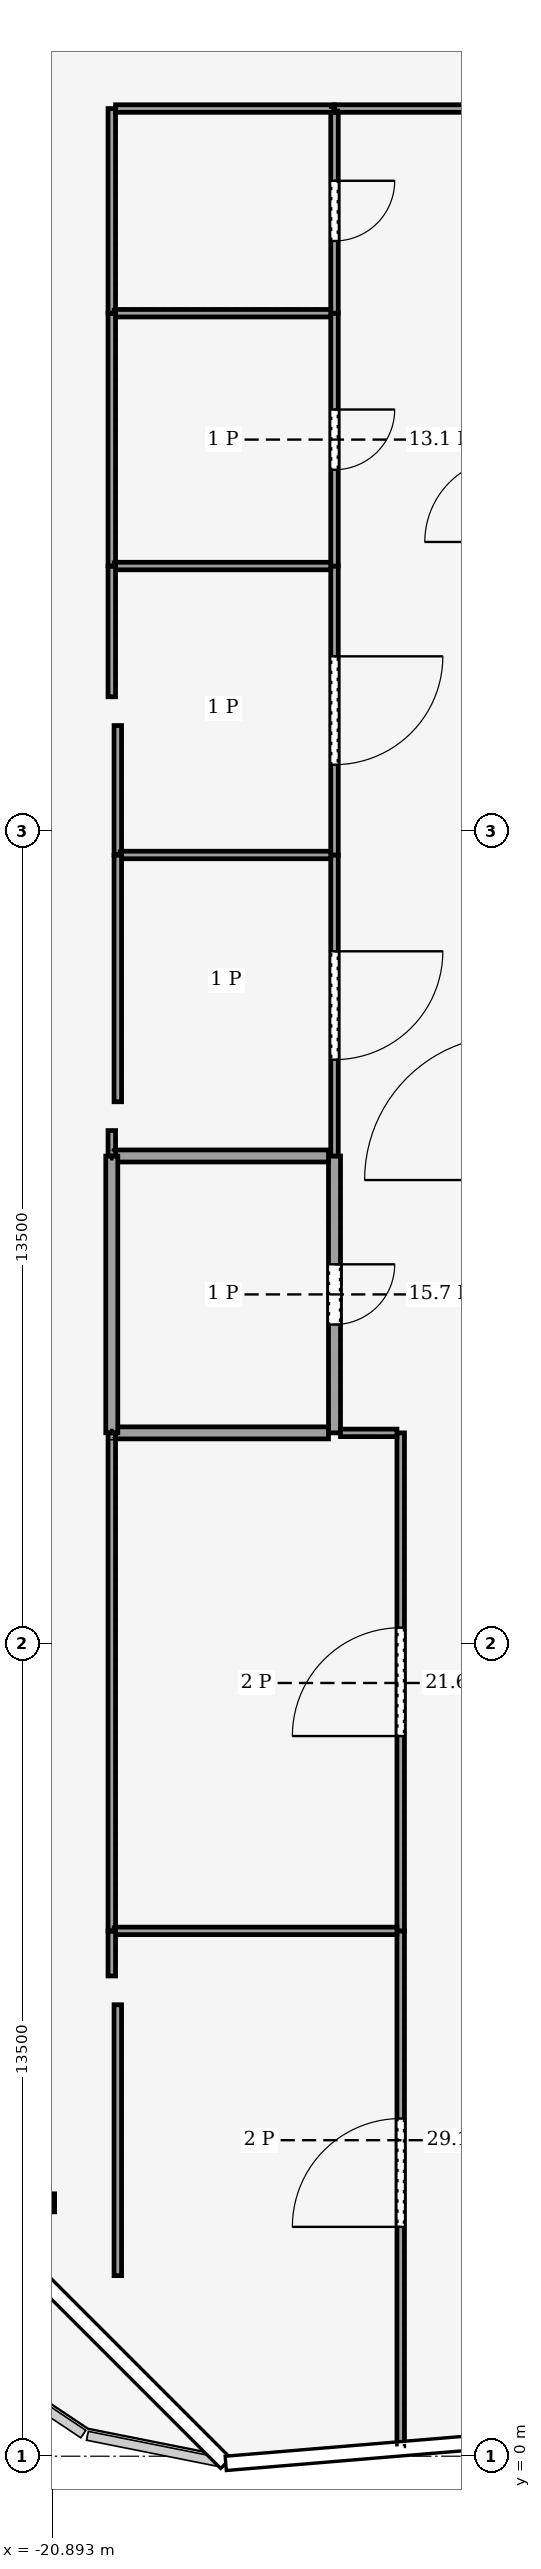
"""IFC4 building model, lengths in metres.
Left out: names, types, materials, properties, quantities, classifications, styles, units other than length and angle.
Written with IfcOpenShell. Run it as: python <this file> out.ifc"""

import sys

from ifc_helpers import new_model, si_unit, direction, frame, frame_2d, origin, origin_2d, place, context, subcontext, project, spatial, rectangle, hollow_rectangle, i_section, extrude, element, fill, save


model = new_model("IFC4")
c1 = context("Model", 3, precision=1e-05, world=origin(), true_north=direction((0.0, 1.0)))
c2 = subcontext(c1, "Body", "Model", "MODEL_VIEW")
j1 = project(units=[si_unit("LENGTHUNIT", "METRE"), si_unit("PLANEANGLEUNIT", "RADIAN")], contexts=[c1])
p1 = place(None, origin())
s1 = spatial("IfcSite", under=j1, at=p1, CompositionType="ELEMENT")
p2 = place(p1, origin())
s2 = spatial("IfcBuilding", under=s1, at=p2, CompositionType="ELEMENT")
p3 = place(p2, frame((0.0, 0.0, 58.0)))
s3 = spatial("IfcBuildingStorey", under=s2, at=p3, CompositionType="ELEMENT", Elevation=58.0)
p4 = place(p3, frame((-21.0, 3.0, 0.49), z_axis=(0.0, 0.598720715582, 0.800957867015), x_axis=(-1.0, 0.0, 0.0)))
e1 = element("IfcColumn", 1, at=p4, inside=s3, PredefinedType="COLUMN", context=c2, shape_type="SweptSolid", body=[
    extrude(hollow_rectangle(XDim=1.6, YDim=1.6, WallThickness=0.09, at=origin_2d()), origin(), (0.0, 0.0, 1.0), 7.516),
])
p5 = place(p3, frame((-21.0, 22.5, 0.588), z_axis=(0.0, 0.731587227798, 0.681747847905), x_axis=(-1.0, 0.0, 0.0)))
e2 = element("IfcColumn", 2, at=p5, inside=s3, PredefinedType="COLUMN", context=c2, shape_type="SweptSolid", body=[
    extrude(hollow_rectangle(XDim=1.6, YDim=1.6, WallThickness=0.09, at=origin_2d()), origin(), (0.0, 0.0, 1.0), 8.543),
])
p6 = place(p3, frame((-21.0, 4.209, 3.645), z_axis=(0.0, 0.0, 1.0), x_axis=(1.0, 0.0, 0.0)))
e3 = element("IfcColumn", 3, at=p6, inside=s3, PredefinedType="COLUMN", context=c2, shape_type="SweptSolid", body=[
    extrude(i_section(OverallWidth=0.3, OverallDepth=0.3, WebThickness=0.011, FlangeThickness=0.019, FilletRadius=0.027, at=origin_2d()), origin(), (0.0, 0.0, 1.0), 3.055),
])
p7 = place(p3, frame((-16.2, 21.6, 0.0), z_axis=(0.0, 0.0, 1.0), x_axis=(0.0, -1.0, 0.0)))
e4 = element("IfcWall", 4, at=p7, inside=s3, PredefinedType="PARTITIONING", context=c2, shape_type="SweptSolid", body=[
    extrude(rectangle(XDim=4.6, YDim=0.2, at=frame_2d((2.3, 0.0))), origin(), (0.0, 0.0, 1.0), 6.14),
])
p8 = place(p7, frame((1.8, 0.0, 0.0)))
e5 = element("IfcOpeningElement", 5, at=p8, cuts=e4, PredefinedType="OPENING", context=c2, shape_type="SweptSolid", body=[
    extrude(rectangle(XDim=1.0, YDim=2.1, at=frame_2d((0.5, 1.05))), frame((0.0, 0.11, 0.0), z_axis=(0.0, -1.0, 0.0), x_axis=(1.0, 0.0, 0.0)), (0.0, 0.0, 1.0), 0.22),
])
p9 = place(p3, frame((-16.2, 26.6, 0.0), z_axis=(0.0, 0.0, 1.0), x_axis=(0.0, -1.0, 0.0)))
e6 = element("IfcWall", 6, at=p9, inside=s3, PredefinedType="PARTITIONING", context=c2, shape_type="SweptSolid", body=[
    extrude(rectangle(XDim=5.0, YDim=0.125, at=frame_2d((2.5, 0.0))), origin(), (0.0, 0.0, 1.0), 6.44),
])
p10 = place(p9, frame((1.6, 0.0, 0.0)))
e7 = element("IfcOpeningElement", 7, at=p10, cuts=e6, PredefinedType="OPENING", context=c2, shape_type="SweptSolid", body=[
    extrude(rectangle(XDim=1.8, YDim=2.4, at=frame_2d((0.9, 1.2))), frame((0.0, 0.073, 0.0), z_axis=(0.0, -1.0, 0.0), x_axis=(1.0, 0.0, 0.0)), (0.0, 0.0, 1.0), 0.145),
])
p11 = place(p3, frame((-16.2, 31.4, 0.0), z_axis=(0.0, 0.0, 1.0), x_axis=(0.0, -1.0, 0.0)))
e8 = element("IfcWall", 8, at=p11, inside=s3, PredefinedType="PARTITIONING", context=c2, shape_type="SweptSolid", body=[
    extrude(rectangle(XDim=4.8, YDim=0.125, at=frame_2d((2.4, 0.0))), origin(), (0.0, 0.0, 1.0), 6.44),
])
p12 = place(p11, frame((1.5, 0.0, 0.0)))
e9 = element("IfcOpeningElement", 9, at=p12, cuts=e8, PredefinedType="OPENING", context=c2, shape_type="SweptSolid", body=[
    extrude(rectangle(XDim=1.8, YDim=2.4, at=frame_2d((0.9, 1.2))), frame((0.0, 0.073, 0.0), z_axis=(0.0, -1.0, 0.0), x_axis=(1.0, 0.0, 0.0)), (0.0, 0.0, 1.0), 0.145),
])
p13 = place(p3, frame((-16.2, 35.6, 0.0), z_axis=(0.0, 0.0, 1.0), x_axis=(0.0, -1.0, 0.0)))
e10 = element("IfcWall", 10, at=p13, inside=s3, PredefinedType="PARTITIONING", context=c2, shape_type="SweptSolid", body=[
    extrude(rectangle(XDim=4.2, YDim=0.125, at=frame_2d((2.1, 0.0))), origin(), (0.0, 0.0, 1.0), 6.44),
])
p14 = place(p13, frame((1.6, 0.0, 0.0)))
e11 = element("IfcOpeningElement", 11, at=p14, cuts=e10, PredefinedType="OPENING", context=c2, shape_type="SweptSolid", body=[
    extrude(rectangle(XDim=1.0, YDim=2.1, at=frame_2d((0.5, 1.05))), frame((0.0, 0.073, 0.0), z_axis=(0.0, -1.0, 0.0), x_axis=(1.0, 0.0, 0.0)), (0.0, 0.0, 1.0), 0.145),
])
p15 = place(p3, frame((-16.2, 39.0, 0.0), z_axis=(0.0, 0.0, 1.0), x_axis=(0.0, -1.0, 0.0)))
e12 = element("IfcWall", 12, at=p15, inside=s3, PredefinedType="PARTITIONING", context=c2, shape_type="SweptSolid", body=[
    extrude(rectangle(XDim=3.4, YDim=0.125, at=frame_2d((1.7, 0.0))), origin(), (0.0, 0.0, 1.0), 6.14),
])
p16 = place(p15, frame((1.2, 0.0, 0.0)))
e13 = element("IfcOpeningElement", 13, at=p16, cuts=e12, PredefinedType="OPENING", context=c2, shape_type="SweptSolid", body=[
    extrude(rectangle(XDim=1.0, YDim=2.1, at=frame_2d((0.5, 1.05))), frame((0.0, 0.073, 0.0), z_axis=(0.0, -1.0, 0.0), x_axis=(1.0, 0.0, 0.0)), (0.0, 0.0, 1.0), 0.145),
])
p17 = place(p3, frame((-15.1, 0.162, 0.0), z_axis=(0.0, 0.0, 1.0), x_axis=(0.0, 1.0, 0.0)))
e14 = element("IfcWall", 14, at=p17, inside=s3, PredefinedType="PARTITIONING", context=c2, shape_type="SweptSolid", body=[
    extrude(rectangle(XDim=8.565, YDim=0.125, at=frame_2d((4.283, 0.0))), origin(), (0.0, 0.0, 1.0), 6.04),
])
p18 = place(p17, frame((3.648, 0.0, 0.0)))
e15 = element("IfcOpeningElement", 15, at=p18, cuts=e14, PredefinedType="OPENING", context=c2, shape_type="SweptSolid", body=[
    extrude(rectangle(XDim=1.8, YDim=2.4, at=frame_2d((0.9, 1.2))), frame((0.0, 0.073, 0.0), z_axis=(0.0, -1.0, 0.0), x_axis=(1.0, 0.0, 0.0)), (0.0, 0.0, 1.0), 0.145),
])
p19 = place(p3, frame((-15.1, 8.727, 0.0), z_axis=(0.0, 0.0, 1.0), x_axis=(0.0, 1.0, 0.0)))
e16 = element("IfcWall", 16, at=p19, inside=s3, PredefinedType="PARTITIONING", context=c2, shape_type="SweptSolid", body=[
    extrude(rectangle(XDim=8.273, YDim=0.125, at=frame_2d((4.136, 0.0))), origin(), (0.0, 0.0, 1.0), 6.14),
])
p20 = place(p19, frame((3.237, 0.0, 0.0)))
e17 = element("IfcOpeningElement", 17, at=p20, cuts=e16, PredefinedType="OPENING", context=c2, shape_type="SweptSolid", body=[
    extrude(rectangle(XDim=1.8, YDim=2.4, at=frame_2d((0.9, 1.2))), frame((0.0, 0.073, 0.0), z_axis=(0.0, -1.0, 0.0), x_axis=(1.0, 0.0, 0.0)), (0.0, 0.0, 1.0), 0.145),
])
p21 = place(p3, frame((-15.163, 17.0, 0.0), z_axis=(0.0, 0.0, 1.0), x_axis=(-1.0, 0.0, 0.0)))
e18 = element("IfcWall", 18, at=p21, inside=s3, PredefinedType="PARTITIONING", context=c2, shape_type="SweptSolid", body=[
    extrude(rectangle(XDim=0.938, YDim=0.125, at=frame_2d((0.469, 0.0))), origin(), (0.0, 0.0, 1.0), 6.14),
])
p22 = place(p3, frame((-19.9, 21.6, 0.0), z_axis=(0.0, 0.0, 1.0), x_axis=(1.0, 0.0, 0.0)))
e19 = element("IfcWall", 19, at=p22, inside=s3, PredefinedType="PARTITIONING", context=c2, shape_type="SweptSolid", body=[
    extrude(rectangle(XDim=3.6, YDim=0.2, at=frame_2d((1.8, 0.0))), origin(), (0.0, 0.0, 1.0), 6.87),
])
p23 = place(p3, frame((-16.3, 17.0, 0.0), z_axis=(0.0, 0.0, 1.0), x_axis=(-1.0, 0.0, 0.0)))
e20 = element("IfcWall", 20, at=p23, inside=s3, PredefinedType="PARTITIONING", context=c2, shape_type="SweptSolid", body=[
    extrude(rectangle(XDim=3.6, YDim=0.2, at=frame_2d((1.8, 0.0))), origin(), (0.0, 0.0, 1.0), 6.14),
])
p24 = place(p3, frame((-19.8, 26.6, 0.0), z_axis=(0.0, 0.0, 1.0), x_axis=(1.0, 0.0, 0.0)))
e21 = element("IfcWall", 21, at=p24, inside=s3, PredefinedType="PARTITIONING", context=c2, shape_type="SweptSolid", body=[
    extrude(rectangle(XDim=3.538, YDim=0.125, at=frame_2d((1.769, 0.0))), origin(), (0.0, 0.0, 1.0), 6.87),
])
for number, where, z_axis, x_axis in (
    (22, (-19.9, 31.4, 0.0), (0.0, 0.0, 1.0), (1.0, 0.0, 0.0)),
    (23, (-19.9, 35.6, 0.0), (0.0, 0.0, 1.0), (1.0, 0.0, 0.0)),
):
    element("IfcWall", number, at=place(p3, frame(where, z_axis=z_axis, x_axis=x_axis)), inside=s3, PredefinedType="PARTITIONING", context=c2, shape_type="SweptSolid", body=[
        extrude(rectangle(XDim=3.637, YDim=0.125, at=frame_2d((1.819, 0.0))), origin(), (0.0, 0.0, 1.0), 6.87),
    ])
p25 = place(p3, frame((-19.9, 8.727, 0.0), z_axis=(0.0, 0.0, 1.0), x_axis=(1.0, 0.0, 0.0)))
e24 = element("IfcWall", 24, at=p25, inside=s3, PredefinedType="PARTITIONING", context=c2, shape_type="SweptSolid", body=[
    extrude(rectangle(XDim=4.737, YDim=0.125, at=frame_2d((2.369, 0.0))), origin(), (0.0, 0.0, 1.0), 6.34),
])
p26 = place(p3, frame((-16.198, 39.0, 0.0), z_axis=(0.0, 0.0, 1.0), x_axis=(1.0, 0.0, 0.0)))
e25 = element("IfcWall", 25, at=p26, inside=s3, PredefinedType="PARTITIONING", context=c2, shape_type="SweptSolid", body=[
    extrude(rectangle(XDim=2.148, YDim=0.125, at=frame_2d((1.074, 0.0))), origin(), (0.0, 0.0, 1.0), 6.14),
])
p27 = place(p3, frame((-19.9, 17.002, 0.0), z_axis=(0.0, 0.0, 1.0), x_axis=(0.0, 1.0, 0.0)))
e26 = element("IfcWall", 26, at=p27, inside=s3, PredefinedType="PARTITIONING", context=c2, shape_type="SweptSolid", body=[
    extrude(rectangle(XDim=4.596, YDim=0.2, at=frame_2d((2.298, 0.0))), origin(), (0.0, 0.0, 1.0), 6.14),
])
p28 = place(p3, frame((-19.9, 21.602, 0.0), z_axis=(0.0, 0.0, 1.0), x_axis=(0.0, 1.0, 0.0)))
e27 = element("IfcWall", 27, at=p28, inside=s3, PredefinedType="PARTITIONING", context=c2, shape_type="SweptSolid", body=[
    extrude(rectangle(XDim=0.42, YDim=0.125, at=frame_2d((0.21, 0.0))), origin(), (0.0, 0.0, 1.0), 6.87),
])
p29 = place(p3, frame((-19.8, 22.5, 0.0), z_axis=(0.0, 0.0, 1.0), x_axis=(0.0, 1.0, 0.0)))
e28 = element("IfcWall", 28, at=p29, inside=s3, PredefinedType="PARTITIONING", context=c2, shape_type="SweptSolid", body=[
    extrude(rectangle(XDim=4.098, YDim=0.125, at=frame_2d((2.049, 0.0))), origin(), (0.0, 0.0, 1.0), 6.44),
])
p30 = place(p3, frame((-19.8, 26.602, 0.0), z_axis=(0.0, 0.0, 1.0), x_axis=(0.0, 1.0, 0.0)))
e29 = element("IfcWall", 29, at=p30, inside=s3, PredefinedType="PARTITIONING", context=c2, shape_type="SweptSolid", body=[
    extrude(rectangle(XDim=2.148, YDim=0.125, at=frame_2d((1.074, 0.0))), origin(), (0.0, 0.0, 1.0), 6.44),
])
p31 = place(p3, frame((-19.9, 29.228, 0.0), z_axis=(0.0, 0.0, 1.0), x_axis=(0.0, 1.0, 0.0)))
e30 = element("IfcWall", 30, at=p31, inside=s3, PredefinedType="PARTITIONING", context=c2, shape_type="SweptSolid", body=[
    extrude(rectangle(XDim=2.17, YDim=0.125, at=frame_2d((1.085, 0.0))), origin(), (0.0, 0.0, 1.0), 6.44),
])
p32 = place(p3, frame((-19.9, 31.402, 0.0), z_axis=(0.0, 0.0, 1.0), x_axis=(0.0, 1.0, 0.0)))
e31 = element("IfcWall", 31, at=p32, inside=s3, PredefinedType="PARTITIONING", context=c2, shape_type="SweptSolid", body=[
    extrude(rectangle(XDim=4.196, YDim=0.125, at=frame_2d((2.098, 0.0))), origin(), (0.0, 0.0, 1.0), 6.44),
])
p33 = place(p3, frame((-19.9, 35.602, 0.0), z_axis=(0.0, 0.0, 1.0), x_axis=(0.0, 1.0, 0.0)))
e32 = element("IfcWall", 32, at=p33, inside=s3, PredefinedType="PARTITIONING", context=c2, shape_type="SweptSolid", body=[
    extrude(rectangle(XDim=3.398, YDim=0.125, at=frame_2d((1.699, 0.0))), origin(), (0.0, 0.0, 1.0), 6.14),
])
p34 = place(p3, frame((-19.837, 39.0, 0.0), z_axis=(0.0, 0.0, 1.0), x_axis=(1.0, 0.0, 0.0)))
e33 = element("IfcWall", 33, at=p34, inside=s3, PredefinedType="PARTITIONING", context=c2, shape_type="SweptSolid", body=[
    extrude(rectangle(XDim=3.635, YDim=0.125, at=frame_2d((1.818, 0.0))), origin(), (0.0, 0.0, 1.0), 6.14),
])
p35 = place(p3, frame((-19.8, 3.0, 0.0), z_axis=(0.0, 0.0, 1.0), x_axis=(0.0, 1.0, 0.0)))
e34 = element("IfcWall", 34, at=p35, inside=s3, PredefinedType="PARTITIONING", context=c2, shape_type="SweptSolid", body=[
    extrude(rectangle(XDim=4.5, YDim=0.125, at=frame_2d((2.25, 0.0))), origin(), (0.0, 0.0, 1.0), 5.93),
])
p36 = place(p3, frame((-19.9, 7.978, 0.0), z_axis=(0.0, 0.0, 1.0), x_axis=(0.0, 1.0, 0.0)))
e35 = element("IfcWall", 35, at=p36, inside=s3, PredefinedType="PARTITIONING", context=c2, shape_type="SweptSolid", body=[
    extrude(rectangle(XDim=0.747, YDim=0.125, at=frame_2d((0.374, 0.0))), origin(), (0.0, 0.0, 1.0), 6.34),
])
p37 = place(p3, frame((-19.9, 8.729, 0.0), z_axis=(0.0, 0.0, 1.0), x_axis=(0.0, 1.0, 0.0)))
e36 = element("IfcWall", 36, at=p37, inside=s3, PredefinedType="PARTITIONING", context=c2, shape_type="SweptSolid", body=[
    extrude(rectangle(XDim=8.269, YDim=0.125, at=frame_2d((4.135, 0.0))), origin(), (0.0, 0.0, 1.0), 6.14),
])
p38 = place(p8, origin())
e37 = element("IfcDoor", 37, at=p38, inside=s3, OperationType="SINGLE_SWING_RIGHT", PredefinedType="DOOR", context=c2, shape_type="SweptSolid", body=[
    extrude(rectangle(XDim=1.0, YDim=2.1, at=frame_2d((0.5, 1.05))), frame((0.0, 0.025, 0.0), z_axis=(0.0, -1.0, 0.0), x_axis=(1.0, 0.0, 0.0)), (0.0, 0.0, 1.0), 0.05),
])
fill(e5, e37)
p39 = place(p10, origin())
e38 = element("IfcDoor", 38, at=p39, inside=s3, OperationType="DOUBLE_DOOR_SINGLE_SWING", PredefinedType="DOOR", context=c2, shape_type="SweptSolid", body=[
    extrude(rectangle(XDim=1.8, YDim=2.4, at=frame_2d((0.9, 1.2))), frame((0.0, 0.025, 0.0), z_axis=(0.0, -1.0, 0.0), x_axis=(1.0, 0.0, 0.0)), (0.0, 0.0, 1.0), 0.05),
])
fill(e7, e38)
p40 = place(p12, origin())
e39 = element("IfcDoor", 39, at=p40, inside=s3, OperationType="DOUBLE_DOOR_SINGLE_SWING", PredefinedType="DOOR", context=c2, shape_type="SweptSolid", body=[
    extrude(rectangle(XDim=1.8, YDim=2.4, at=frame_2d((0.9, 1.2))), frame((0.0, 0.025, 0.0), z_axis=(0.0, -1.0, 0.0), x_axis=(1.0, 0.0, 0.0)), (0.0, 0.0, 1.0), 0.05),
])
fill(e9, e39)
p41 = place(p14, origin())
e40 = element("IfcDoor", 40, at=p41, inside=s3, OperationType="SINGLE_SWING_LEFT", PredefinedType="DOOR", context=c2, shape_type="SweptSolid", body=[
    extrude(rectangle(XDim=1.0, YDim=2.1, at=frame_2d((0.5, 1.05))), frame((0.0, 0.025, 0.0), z_axis=(0.0, -1.0, 0.0), x_axis=(1.0, 0.0, 0.0)), (0.0, 0.0, 1.0), 0.05),
])
fill(e11, e40)
p42 = place(p16, origin())
e41 = element("IfcDoor", 41, at=p42, inside=s3, OperationType="SINGLE_SWING_RIGHT", PredefinedType="DOOR", context=c2, shape_type="SweptSolid", body=[
    extrude(rectangle(XDim=1.0, YDim=2.1, at=frame_2d((0.5, 1.05))), frame((0.0, 0.025, 0.0), z_axis=(0.0, -1.0, 0.0), x_axis=(1.0, 0.0, 0.0)), (0.0, 0.0, 1.0), 0.05),
])
fill(e13, e41)
p43 = place(p18, origin())
e42 = element("IfcDoor", 42, at=p43, inside=s3, OperationType="DOUBLE_DOOR_SINGLE_SWING", PredefinedType="DOOR", context=c2, shape_type="SweptSolid", body=[
    extrude(rectangle(XDim=1.8, YDim=2.4, at=frame_2d((0.9, 1.2))), frame((0.0, 0.025, 0.0), z_axis=(0.0, -1.0, 0.0), x_axis=(1.0, 0.0, 0.0)), (0.0, 0.0, 1.0), 0.05),
])
fill(e15, e42)
p44 = place(p20, origin())
e43 = element("IfcDoor", 43, at=p44, inside=s3, OperationType="DOUBLE_DOOR_SINGLE_SWING", PredefinedType="DOOR", context=c2, shape_type="SweptSolid", body=[
    extrude(rectangle(XDim=1.8, YDim=2.4, at=frame_2d((0.9, 1.2))), frame((0.0, 0.025, 0.0), z_axis=(0.0, -1.0, 0.0), x_axis=(1.0, 0.0, 0.0)), (0.0, 0.0, 1.0), 0.05),
])
fill(e17, e43)
save(model, sys.argv[1])
